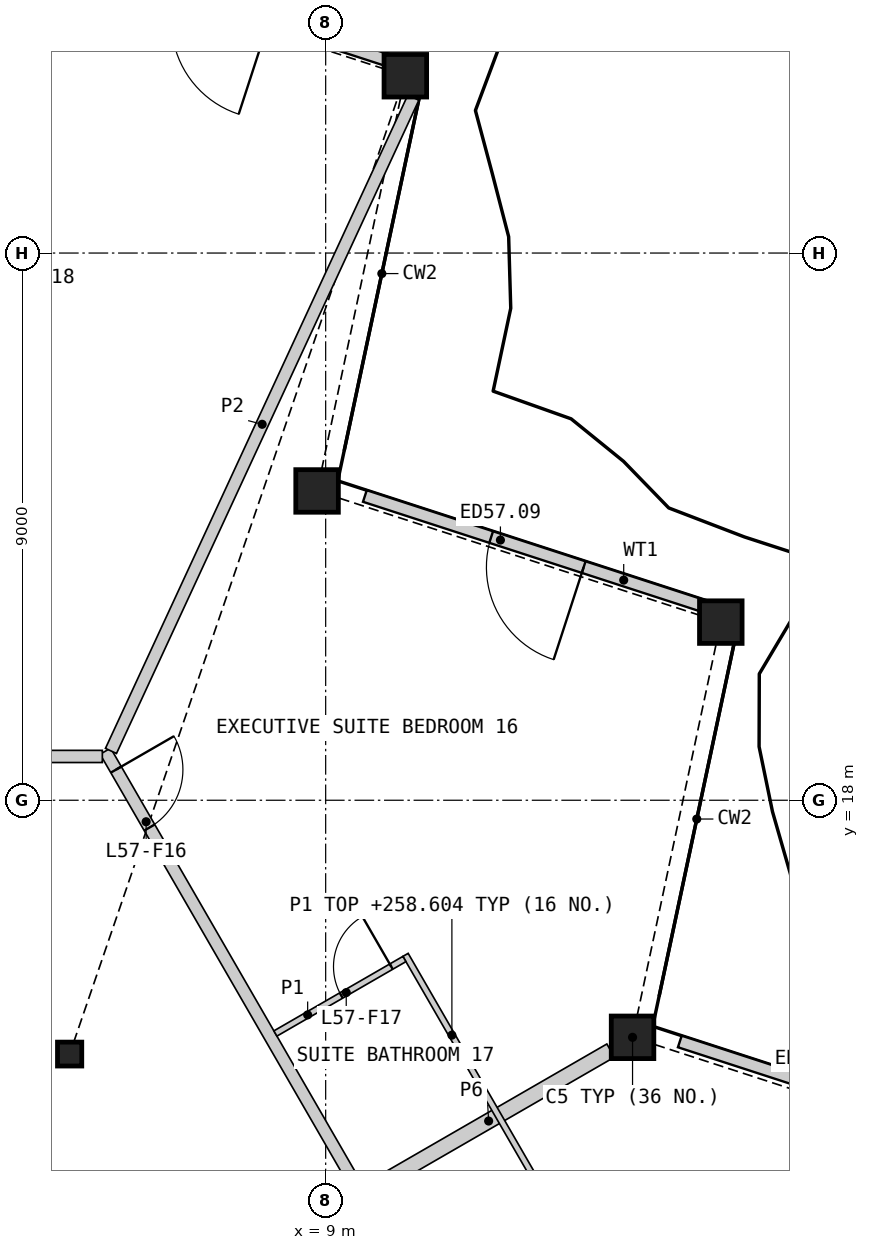
"""IFC4 building model, lengths in metres.
Left out: names, types, materials, properties, quantities, classifications, styles, units other than length and angle.
Written with IfcOpenShell. Run it as: python <this file> out.ifc"""

import sys

from ifc_helpers import new_model, si_unit, direction, frame, frame_2d, origin, origin_2d, place, context, subcontext, project, spatial, rectangle, hollow_rectangle, i_section, extrude, element, fill, save


model = new_model("IFC4")
c1 = context("Model", 3, precision=1e-05, world=origin(), true_north=direction((0.0, 1.0)))
c2 = subcontext(c1, "Body", "Model", "MODEL_VIEW")
j1 = project(units=[si_unit("LENGTHUNIT", "METRE"), si_unit("PLANEANGLEUNIT", "RADIAN")], contexts=[c1])
p1 = place(None, origin())
s1 = spatial("IfcSite", under=j1, at=p1, CompositionType="ELEMENT")
p2 = place(p1, origin())
s2 = spatial("IfcBuilding", under=s1, at=p2, CompositionType="ELEMENT")
p3 = place(p2, frame((0.0, 0.0, 256.2)))
s3 = spatial("IfcBuildingStorey", under=s2, at=p3, CompositionType="ELEMENT", Elevation=256.2)
for number, where, z_axis, x_axis in (
    (1, (14.047, 14.101, 0.0), (0.0, 0.0, 1.0), (1.0, 0.0, 0.0)),
    (2, (15.499, 20.93, 0.0), (0.0, 0.0, 1.0), (1.0, 0.0, 0.0)),
    (3, (8.859, 23.087, 0.0), (0.0, 0.0, 1.0), (1.0, 0.0, 0.0)),
    (4, (10.31, 29.916, 0.0), (0.0, 0.0, 1.0), (1.0, 0.0, 0.0)),
):
    element("IfcColumn", number, at=place(p3, frame(where, z_axis=z_axis, x_axis=x_axis)), inside=s3, PredefinedType="COLUMN", context=c2, shape_type="SweptSolid", body=[
        extrude(hollow_rectangle(XDim=0.7, YDim=0.7, WallThickness=0.045, at=origin_2d()), origin(), (0.0, 0.0, 1.0), 3.6),
    ])
p4 = place(p3, frame((4.789, 13.825, 0.0), z_axis=(0.0, 0.0, 1.0), x_axis=(1.0, 0.0, 0.0)))
e5 = element("IfcColumn", 5, at=p4, inside=s3, PredefinedType="COLUMN", context=c2, shape_type="SweptSolid", body=[
    extrude(i_section(OverallWidth=0.399, OverallDepth=0.393, WebThickness=0.023, FlangeThickness=0.037, at=origin_2d()), origin(), (0.0, 0.0, 1.0), 3.6),
])
p5 = place(p3, frame((20.5, 12.188, 0.0), z_axis=(0.0, 0.0, 1.0), x_axis=(-0.951053307318, 0.309026870418, 0.0)))
e6 = element("IfcWall", 6, at=p5, inside=s3, PredefinedType="SOLIDWALL", context=c2, shape_type="SweptSolid", body=[
    extrude(rectangle(XDim=5.968, YDim=0.2, at=frame_2d((2.984, 0.0))), origin(), (0.0, 0.0, 1.0), 2.701),
])
p6 = place(p5, frame((2.184, 0.0, 0.0)))
e7 = element("IfcOpeningElement", 7, at=p6, cuts=e6, PredefinedType="OPENING", context=c2, shape_type="SweptSolid", body=[
    extrude(rectangle(XDim=1.6, YDim=2.4, at=frame_2d((0.8, 1.2))), frame((0.0, 0.11, 0.0), z_axis=(0.0, -1.0, 0.0), x_axis=(1.0, 0.0, 0.0)), (0.0, 0.0, 1.0), 0.22),
])
p7 = place(p3, frame((15.321, 21.159, 0.0), z_axis=(0.0, 0.0, 1.0), x_axis=(-0.951053307318, 0.309026870418, 0.0)))
e8 = element("IfcWall", 8, at=p7, inside=s3, PredefinedType="SOLIDWALL", context=c2, shape_type="SweptSolid", body=[
    extrude(rectangle(XDim=5.968, YDim=0.2, at=frame_2d((2.984, 0.0))), origin(), (0.0, 0.0, 1.0), 2.701),
])
p8 = place(p7, frame((2.184, 0.0, 0.0)))
e9 = element("IfcOpeningElement", 9, at=p8, cuts=e8, PredefinedType="OPENING", context=c2, shape_type="SweptSolid", body=[
    extrude(rectangle(XDim=1.6, YDim=2.4, at=frame_2d((0.8, 1.2))), frame((0.0, 0.11, 0.0), z_axis=(0.0, -1.0, 0.0), x_axis=(1.0, 0.0, 0.0)), (0.0, 0.0, 1.0), 0.22),
])
p9 = place(p3, frame((10.141, 30.131, 0.0), z_axis=(0.0, 0.0, 1.0), x_axis=(-0.951049400374, 0.309038894069, 0.0)))
e10 = element("IfcWall", 10, at=p9, inside=s3, PredefinedType="SOLIDWALL", context=c2, shape_type="SweptSolid", body=[
    extrude(rectangle(XDim=5.968, YDim=0.2, at=frame_2d((2.984, 0.0))), origin(), (0.0, 0.0, 1.0), 2.701),
])
p10 = place(p9, frame((2.184, 0.0, 0.0)))
e11 = element("IfcOpeningElement", 11, at=p10, cuts=e10, PredefinedType="OPENING", context=c2, shape_type="SweptSolid", body=[
    extrude(rectangle(XDim=1.6, YDim=2.4, at=frame_2d((0.8, 1.2))), frame((0.0, 0.11, 0.0), z_axis=(0.0, -1.0, 0.0), x_axis=(1.0, 0.0, 0.0)), (0.0, 0.0, 1.0), 0.22),
])
p11 = place(p3, frame((5.377, 18.807, 0.0), z_axis=(0.0, 0.0, 1.0), x_axis=(0.499999852422, -0.866025488988, 0.0)))
e12 = element("IfcWall", 12, at=p11, inside=s3, PredefinedType="PARTITIONING", context=c2, shape_type="SweptSolid", body=[
    extrude(rectangle(XDim=27.198, YDim=0.2, at=frame_2d((13.599, 0.0))), origin(), (0.0, 0.0, 1.0), 3.25),
])
p12 = place(p11, frame((25.096, 0.0, 0.0)))
e13 = element("IfcOpeningElement", 13, at=p12, cuts=e12, PredefinedType="OPENING", context=c2, shape_type="SweptSolid", body=[
    extrude(rectangle(XDim=0.95, YDim=2.1, at=frame_2d((0.475, 1.05))), frame((0.0, 0.11, 0.0), z_axis=(0.0, -1.0, 0.0), x_axis=(1.0, 0.0, 0.0)), (0.0, 0.0, 1.0), 0.22),
])
p13 = place(p11, frame((19.122, 0.0, 0.0)))
e14 = element("IfcOpeningElement", 14, at=p13, cuts=e12, PredefinedType="OPENING", context=c2, shape_type="SweptSolid", body=[
    extrude(rectangle(XDim=1.0, YDim=2.1, at=frame_2d((0.5, 1.05))), frame((0.0, 0.11, 0.0), z_axis=(0.0, -1.0, 0.0), x_axis=(1.0, 0.0, 0.0)), (0.0, 0.0, 1.0), 0.22),
])
p14 = place(p11, frame((17.115, 0.0, 0.0)))
e15 = element("IfcOpeningElement", 15, at=p14, cuts=e12, PredefinedType="OPENING", context=c2, shape_type="SweptSolid", body=[
    extrude(rectangle(XDim=1.1, YDim=2.1, at=frame_2d((0.55, 1.05))), frame((0.0, 0.11, 0.0), z_axis=(0.0, -1.0, 0.0), x_axis=(1.0, 0.0, 0.0)), (0.0, 0.0, 1.0), 0.22),
])
p15 = place(p11, frame((0.35, 0.0, 0.0)))
e16 = element("IfcOpeningElement", 16, at=p15, cuts=e12, PredefinedType="OPENING", context=c2, shape_type="SweptSolid", body=[
    extrude(rectangle(XDim=1.1, YDim=2.1, at=frame_2d((0.55, 1.05))), frame((0.0, 0.11, 0.0), z_axis=(0.0, -1.0, 0.0), x_axis=(1.0, 0.0, 0.0)), (0.0, 0.0, 1.0), 0.22),
])
p16 = place(p3, frame((9.673, 11.566, 0.0), z_axis=(0.0, 0.0, 1.0), x_axis=(0.866039966287, 0.499974776157, 0.0)))
e17 = element("IfcWall", 17, at=p16, inside=s3, PredefinedType="PARTITIONING", context=c2, shape_type="SweptSolid", body=[
    extrude(rectangle(XDim=4.635, YDim=0.25, at=frame_2d((2.317, 0.0))), origin(), (0.0, 0.0, 1.0), 2.404),
])
p17 = place(p3, frame((2.325, 18.72, 0.0), z_axis=(0.0, 0.0, 1.0), x_axis=(1.0, 0.0, 0.0)))
e18 = element("IfcWall", 18, at=p17, inside=s3, PredefinedType="PARTITIONING", context=c2, shape_type="SweptSolid", body=[
    extrude(rectangle(XDim=3.002, YDim=0.2, at=frame_2d((1.501, 0.0))), origin(), (0.0, 0.0, 1.0), 3.25),
])
p18 = place(p3, frame((5.469, 18.811, 0.0), z_axis=(0.0, 0.0, 1.0), x_axis=(0.419996836618, 0.907525568362, 0.0)))
e19 = element("IfcWall", 19, at=p18, inside=s3, PredefinedType="PARTITIONING", context=c2, shape_type="SweptSolid", body=[
    extrude(rectangle(XDim=11.84, YDim=0.2, at=frame_2d((5.92, 0.0))), origin(), (0.0, 0.0, 1.0), 2.404),
])
p19 = place(p3, frame((10.313, 15.457, 0.0), z_axis=(0.0, 0.0, 1.0), x_axis=(0.499978833458, -0.866037623948, 0.0)))
e20 = element("IfcWall", 20, at=p19, inside=s3, PredefinedType="PARTITIONING", context=c2, shape_type="SweptSolid", body=[
    extrude(rectangle(XDim=6.1, YDim=0.1, at=frame_2d((3.05, 0.0))), origin(), (0.0, 0.0, 1.0), 2.404),
])
p20 = place(p3, frame((8.173, 14.164, 0.0), z_axis=(0.0, 0.0, 1.0), x_axis=(0.866014668023, 0.500018594424, 0.0)))
e21 = element("IfcWall", 21, at=p20, inside=s3, PredefinedType="PARTITIONING", context=c2, shape_type="SweptSolid", body=[
    extrude(rectangle(XDim=2.45, YDim=0.1, at=frame_2d((1.225, 0.0))), origin(), (0.0, 0.0, 1.0), 2.404),
])
p21 = place(p20, frame((1.25, 0.0, 0.0)))
e22 = element("IfcOpeningElement", 22, at=p21, cuts=e21, PredefinedType="OPENING", context=c2, shape_type="SweptSolid", body=[
    extrude(rectangle(XDim=0.95, YDim=2.1, at=frame_2d((0.475, 1.05))), frame((0.0, 0.06, 0.0), z_axis=(0.0, -1.0, 0.0), x_axis=(1.0, 0.0, 0.0)), (0.0, 0.0, 1.0), 0.12),
])
p22 = place(p8, origin())
e23 = element("IfcDoor", 23, at=p22, inside=s3, OperationType="DOUBLE_DOOR_SINGLE_SWING", PredefinedType="DOOR", context=c2, shape_type="SweptSolid", body=[
    extrude(rectangle(XDim=1.6, YDim=2.4, at=frame_2d((0.8, 1.2))), frame((0.0, 0.025, 0.0), z_axis=(0.0, -1.0, 0.0), x_axis=(1.0, 0.0, 0.0)), (0.0, 0.0, 1.0), 0.05),
])
fill(e9, e23)
p23 = place(p15, origin())
e24 = element("IfcDoor", 24, at=p23, inside=s3, OperationType="SINGLE_SWING_LEFT", PredefinedType="DOOR", context=c2, shape_type="SweptSolid", body=[
    extrude(rectangle(XDim=1.1, YDim=2.1, at=frame_2d((0.55, 1.05))), frame((0.0, 0.025, 0.0), z_axis=(0.0, -1.0, 0.0), x_axis=(1.0, 0.0, 0.0)), (0.0, 0.0, 1.0), 0.05),
])
fill(e16, e24)
p24 = place(p21, origin())
e25 = element("IfcDoor", 25, at=p24, inside=s3, OperationType="SINGLE_SWING_RIGHT", PredefinedType="DOOR", context=c2, shape_type="SweptSolid", body=[
    extrude(rectangle(XDim=0.95, YDim=2.1, at=frame_2d((0.475, 1.05))), frame((0.0, 0.025, 0.0), z_axis=(0.0, -1.0, 0.0), x_axis=(1.0, 0.0, 0.0)), (0.0, 0.0, 1.0), 0.05),
])
fill(e22, e25)
save(model, sys.argv[1])
